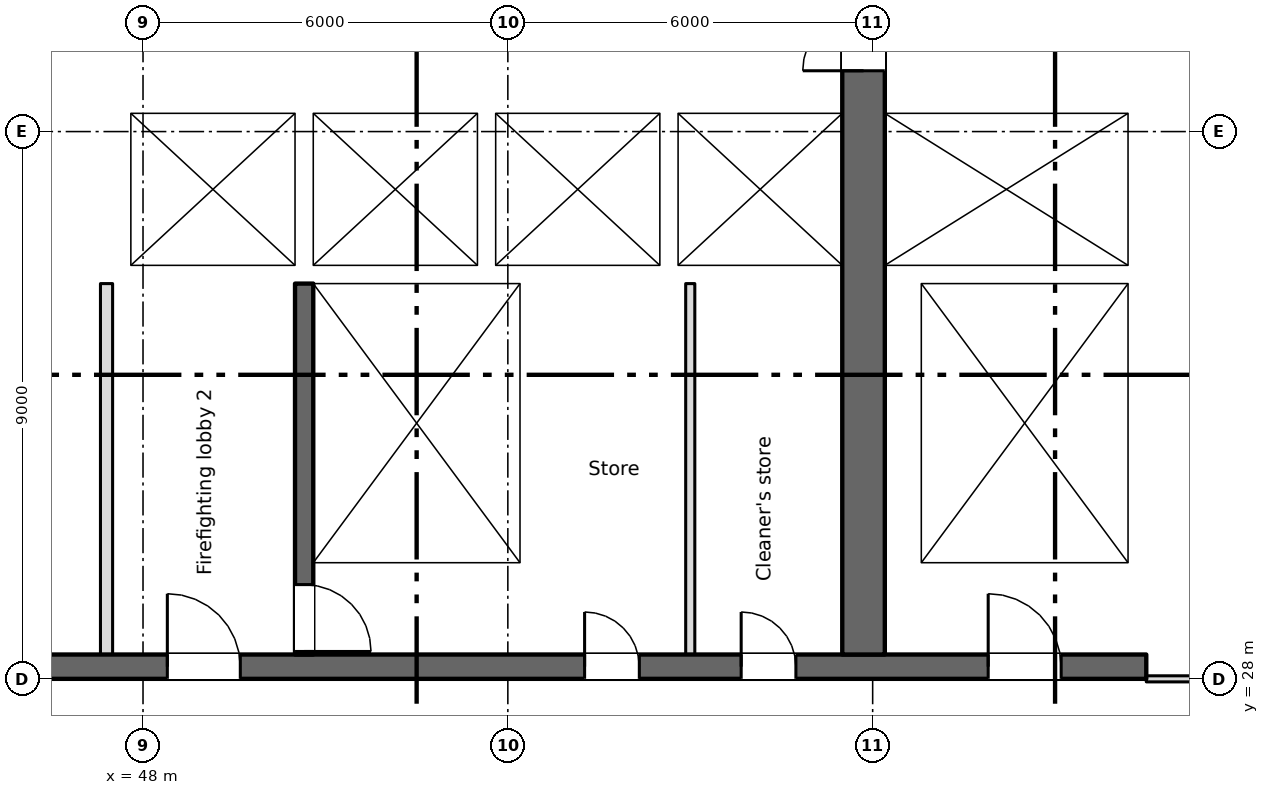
"""IFC4 building model, lengths in metres.
Left out: names, types, materials, properties, quantities, classifications, styles, units other than length and angle.
Written with IfcOpenShell. Run it as: python <this file> out.ifc"""

import sys

from ifc_helpers import new_model, si_unit, direction, frame, frame_2d, origin, place, context, subcontext, project, spatial, rectangle, extrude, element, fill, save


model = new_model("IFC4")
c1 = context("Model", 3, precision=1e-05, world=origin(), true_north=direction((0.0, 1.0)))
c2 = subcontext(c1, "Body", "Model", "MODEL_VIEW")
j1 = project(units=[si_unit("LENGTHUNIT", "METRE"), si_unit("PLANEANGLEUNIT", "RADIAN")], contexts=[c1])
p1 = place(None, origin())
s1 = spatial("IfcSite", under=j1, at=p1, CompositionType="ELEMENT")
p2 = place(p1, origin())
s2 = spatial("IfcBuilding", under=s1, at=p2, CompositionType="ELEMENT")
p3 = place(p2, frame((0.0, 0.0, 200.5)))
s3 = spatial("IfcBuildingStorey", under=s2, at=p3, CompositionType="ELEMENT", Elevation=200.5)
p4 = place(p3, frame((6.6, 28.2, 0.0), z_axis=(0.0, 0.0, 1.0), x_axis=(1.0, 0.0, 0.0)))
e1 = element("IfcWall", 1, at=p4, inside=s3, PredefinedType="SHEAR", context=c2, shape_type="SweptSolid", body=[
    extrude(rectangle(XDim=57.9, YDim=0.4, at=frame_2d((28.95, 0.0))), origin(), (0.0, 0.0, 1.0), 3.35),
])
p5 = place(p4, frame((13.95, 0.0, 0.0)))
e2 = element("IfcOpeningElement", 2, at=p5, cuts=e1, PredefinedType="OPENING", context=c2, shape_type="SweptSolid", body=[
    extrude(rectangle(XDim=0.9, YDim=2.1, at=frame_2d((0.45, 1.05))), frame((0.0, 0.21, 0.0), z_axis=(0.0, -1.0, 0.0), x_axis=(1.0, 0.0, 0.0)), (0.0, 0.0, 1.0), 0.42),
])
p6 = place(p4, frame((48.663, 0.0, 0.0)))
e3 = element("IfcOpeningElement", 3, at=p6, cuts=e1, PredefinedType="OPENING", context=c2, shape_type="SweptSolid", body=[
    extrude(rectangle(XDim=0.9, YDim=2.1, at=frame_2d((0.45, 1.05))), frame((0.0, 0.21, 0.0), z_axis=(0.0, -1.0, 0.0), x_axis=(1.0, 0.0, 0.0)), (0.0, 0.0, 1.0), 0.42),
])
p7 = place(p4, frame((51.238, 0.0, 0.0)))
e4 = element("IfcOpeningElement", 4, at=p7, cuts=e1, PredefinedType="OPENING", context=c2, shape_type="SweptSolid", body=[
    extrude(rectangle(XDim=0.9, YDim=2.1, at=frame_2d((0.45, 1.05))), frame((0.0, 0.21, 0.0), z_axis=(0.0, -1.0, 0.0), x_axis=(1.0, 0.0, 0.0)), (0.0, 0.0, 1.0), 0.42),
])
p8 = place(p4, frame((1.45, 0.0, 0.0)))
e5 = element("IfcOpeningElement", 5, at=p8, cuts=e1, PredefinedType="OPENING", context=c2, shape_type="SweptSolid", body=[
    extrude(rectangle(XDim=0.9, YDim=2.1, at=frame_2d((0.45, 1.05))), frame((0.0, 0.21, 0.0), z_axis=(0.0, -1.0, 0.0), x_axis=(1.0, 0.0, 0.0)), (0.0, 0.0, 1.0), 0.42),
])
p9 = place(p4, frame((4.8, 0.0, 0.0)))
e6 = element("IfcOpeningElement", 6, at=p9, cuts=e1, PredefinedType="OPENING", context=c2, shape_type="SweptSolid", body=[
    extrude(rectangle(XDim=1.2, YDim=2.1, at=frame_2d((0.6, 1.05))), frame((0.0, 0.21, 0.0), z_axis=(0.0, -1.0, 0.0), x_axis=(1.0, 0.0, 0.0)), (0.0, 0.0, 1.0), 0.42),
])
p10 = place(p4, frame((31.8, 0.0, 0.0)))
e7 = element("IfcOpeningElement", 7, at=p10, cuts=e1, PredefinedType="OPENING", context=c2, shape_type="SweptSolid", body=[
    extrude(rectangle(XDim=1.2, YDim=2.1, at=frame_2d((0.6, 1.05))), frame((0.0, 0.21, 0.0), z_axis=(0.0, -1.0, 0.0), x_axis=(1.0, 0.0, 0.0)), (0.0, 0.0, 1.0), 0.42),
])
p11 = place(p4, frame((55.3, 0.0, 0.0)))
e8 = element("IfcOpeningElement", 8, at=p11, cuts=e1, PredefinedType="OPENING", context=c2, shape_type="SweptSolid", body=[
    extrude(rectangle(XDim=1.2, YDim=2.1, at=frame_2d((0.6, 1.05))), frame((0.0, 0.21, 0.0), z_axis=(0.0, -1.0, 0.0), x_axis=(1.0, 0.0, 0.0)), (0.0, 0.0, 1.0), 0.42),
])
p12 = place(p4, frame((21.8, 0.0, 0.0)))
e9 = element("IfcOpeningElement", 9, at=p12, cuts=e1, PredefinedType="OPENING", context=c2, shape_type="SweptSolid", body=[
    extrude(rectangle(XDim=1.2, YDim=2.1, at=frame_2d((0.6, 1.05))), frame((0.0, 0.21, 0.0), z_axis=(0.0, -1.0, 0.0), x_axis=(1.0, 0.0, 0.0)), (0.0, 0.0, 1.0), 0.42),
])
p13 = place(p4, frame((41.8, 0.0, 0.0)))
e10 = element("IfcOpeningElement", 10, at=p13, cuts=e1, PredefinedType="OPENING", context=c2, shape_type="SweptSolid", body=[
    extrude(rectangle(XDim=1.2, YDim=2.1, at=frame_2d((0.6, 1.05))), frame((0.0, 0.21, 0.0), z_axis=(0.0, -1.0, 0.0), x_axis=(1.0, 0.0, 0.0)), (0.0, 0.0, 1.0), 0.42),
])
p14 = place(p4, frame((24.95, 0.0, 0.0)))
e11 = element("IfcOpeningElement", 11, at=p14, cuts=e1, PredefinedType="OPENING", context=c2, shape_type="SweptSolid", body=[
    extrude(rectangle(XDim=2.4, YDim=2.1, at=frame_2d((1.2, 1.05))), frame((0.0, 0.21, 0.0), z_axis=(0.0, -1.0, 0.0), x_axis=(1.0, 0.0, 0.0)), (0.0, 0.0, 1.0), 0.42),
])
p15 = place(p4, frame((37.45, 0.0, 0.0)))
e12 = element("IfcOpeningElement", 12, at=p15, cuts=e1, PredefinedType="OPENING", context=c2, shape_type="SweptSolid", body=[
    extrude(rectangle(XDim=2.4, YDim=2.1, at=frame_2d((1.2, 1.05))), frame((0.0, 0.21, 0.0), z_axis=(0.0, -1.0, 0.0), x_axis=(1.0, 0.0, 0.0)), (0.0, 0.0, 1.0), 0.42),
])
p16 = place(p4, frame((8.1, 0.0, 0.0)))
e13 = element("IfcOpeningElement", 13, at=p16, cuts=e1, PredefinedType="OPENING", context=c2, shape_type="SweptSolid", body=[
    extrude(rectangle(XDim=2.4, YDim=2.1, at=frame_2d((1.2, 1.05))), frame((0.0, 0.21, 0.0), z_axis=(0.0, -1.0, 0.0), x_axis=(1.0, 0.0, 0.0)), (0.0, 0.0, 1.0), 0.42),
])
p17 = place(p4, frame((28.95, 0.0, 0.0)))
e14 = element("IfcOpeningElement", 14, at=p17, cuts=e1, PredefinedType="OPENING", context=c2, shape_type="SweptSolid", body=[
    extrude(rectangle(XDim=0.9, YDim=2.1, at=frame_2d((0.45, 1.05))), frame((0.0, 0.21, 0.0), z_axis=(0.0, -1.0, 0.0), x_axis=(1.0, 0.0, 0.0)), (0.0, 0.0, 1.0), 0.42),
])
p18 = place(p4, frame((34.95, 0.0, 0.0)))
e15 = element("IfcOpeningElement", 15, at=p18, cuts=e1, PredefinedType="OPENING", context=c2, shape_type="SweptSolid", body=[
    extrude(rectangle(XDim=0.9, YDim=2.1, at=frame_2d((0.45, 1.05))), frame((0.0, 0.21, 0.0), z_axis=(0.0, -1.0, 0.0), x_axis=(1.0, 0.0, 0.0)), (0.0, 0.0, 1.0), 0.42),
])
p19 = place(p3, frame((64.35, 34.8, 0.0), z_axis=(0.0, 0.0, 1.0), x_axis=(0.0, 1.0, 0.0)))
e16 = element("IfcWall", 16, at=p19, inside=s3, PredefinedType="SHEAR", context=c2, shape_type="SweptSolid", body=[
    extrude(rectangle(XDim=10.5, YDim=0.3, at=frame_2d((5.25, 0.0))), origin(), (0.0, 0.0, 1.0), 3.35),
])
p20 = place(p3, frame((59.85, 28.4, 0.0), z_axis=(0.0, 0.0, 1.0), x_axis=(0.0, 1.0, 0.0)))
e17 = element("IfcWall", 17, at=p20, inside=s3, PredefinedType="SHEAR", context=c2, shape_type="SweptSolid", body=[
    extrude(rectangle(XDim=16.9, YDim=0.7, at=frame_2d((8.45, 0.0))), origin(), (0.0, 0.0, 1.0), 3.35),
])
p21 = place(p20, frame((9.6, 0.0, 0.0)))
e18 = element("IfcOpeningElement", 18, at=p21, cuts=e17, PredefinedType="OPENING", context=c2, shape_type="SweptSolid", body=[
    extrude(rectangle(XDim=2.0, YDim=2.1, at=frame_2d((1.0, 1.05))), frame((0.0, 0.36, 0.0), z_axis=(0.0, -1.0, 0.0), x_axis=(1.0, 0.0, 0.0)), (0.0, 0.0, 1.0), 0.72),
])
p22 = place(p20, frame((15.4, 0.0, 0.0)))
e19 = element("IfcOpeningElement", 19, at=p22, cuts=e17, PredefinedType="OPENING", context=c2, shape_type="SweptSolid", body=[
    extrude(rectangle(XDim=1.2, YDim=2.1, at=frame_2d((0.6, 1.05))), frame((0.0, 0.36, 0.0), z_axis=(0.0, -1.0, 0.0), x_axis=(1.0, 0.0, 0.0)), (0.0, 0.0, 1.0), 0.72),
])
p23 = place(p3, frame((50.65, 34.5, 0.0), z_axis=(0.0, 0.0, 1.0), x_axis=(0.0, -1.0, 0.0)))
e20 = element("IfcWall", 20, at=p23, inside=s3, PredefinedType="SHEAR", context=c2, shape_type="SweptSolid", body=[
    extrude(rectangle(XDim=6.1, YDim=0.3, at=frame_2d((3.05, 0.0))), origin(), (0.0, 0.0, 1.0), 3.35),
])
p24 = place(p23, frame((4.95, 0.0, 0.0)))
e21 = element("IfcOpeningElement", 21, at=p24, cuts=e20, PredefinedType="OPENING", context=c2, shape_type="SweptSolid", body=[
    extrude(rectangle(XDim=1.1, YDim=2.1, at=frame_2d((0.55, 1.05))), frame((0.0, 0.16, 0.0), z_axis=(0.0, -1.0, 0.0), x_axis=(1.0, 0.0, 0.0)), (0.0, 0.0, 1.0), 0.32),
])
p25 = place(p3, frame((54.35, 28.4, 0.0), z_axis=(0.0, 0.0, 1.0), x_axis=(0.0, 1.0, 0.0)))
e22 = element("IfcWall", 22, at=p25, inside=s3, PredefinedType="SHEAR", context=c2, shape_type="SweptSolid", body=[
    extrude(rectangle(XDim=6.1, YDim=0.3, at=frame_2d((3.05, 0.0))), origin(), (0.0, 0.0, 1.0), 3.35),
])
p26 = place(p3, frame((60.5, 28.4, 0.0), z_axis=(0.0, 0.0, 1.0), x_axis=(0.0, 1.0, 0.0)))
e23 = element("IfcWall", 23, at=p26, inside=s3, PredefinedType="SHEAR", context=c2, shape_type="SweptSolid", body=[
    extrude(rectangle(XDim=6.1, YDim=0.6, at=frame_2d((3.05, 0.0))), origin(), (0.0, 0.0, 1.0), 3.35),
])
p27 = place(p3, frame((64.35, 28.4, 0.0), z_axis=(0.0, 0.0, 1.0), x_axis=(0.0, 1.0, 0.0)))
e24 = element("IfcWall", 24, at=p27, inside=s3, PredefinedType="SHEAR", context=c2, shape_type="SweptSolid", body=[
    extrude(rectangle(XDim=6.1, YDim=0.3, at=frame_2d((3.05, 0.0))), origin(), (0.0, 0.0, 1.0), 3.35),
])
p28 = place(p3, frame((47.3, 34.65, 0.0), z_axis=(0.0, 0.0, 1.0), x_axis=(1.0, 0.0, 0.0)))
e25 = element("IfcWall", 25, at=p28, inside=s3, PredefinedType="SHEAR", context=c2, shape_type="SweptSolid", body=[
    extrude(rectangle(XDim=12.2, YDim=0.3, at=frame_2d((6.1, 0.0))), origin(), (0.0, 0.0, 1.0), 3.35),
])
p29 = place(p28, frame((1.3, 0.0, 0.0)))
e26 = element("IfcOpeningElement", 26, at=p29, cuts=e25, PredefinedType="OPENING", context=c2, shape_type="SweptSolid", body=[
    extrude(rectangle(XDim=1.1, YDim=2.1, at=frame_2d((0.55, 1.05))), frame((0.0, 0.16, 0.0), z_axis=(0.0, -1.0, 0.0), x_axis=(1.0, 0.0, 0.0)), (0.0, 0.0, 1.0), 0.32),
])
p30 = place(p3, frame((60.2, 34.65, 0.0), z_axis=(0.0, 0.0, 1.0), x_axis=(1.0, 0.0, 0.0)))
e27 = element("IfcWall", 27, at=p30, inside=s3, PredefinedType="SHEAR", context=c2, shape_type="SweptSolid", body=[
    extrude(rectangle(XDim=4.3, YDim=0.3, at=frame_2d((2.15, 0.0))), origin(), (0.0, 0.0, 1.0), 3.35),
])
p31 = place(p3, frame((47.3, 37.45, 0.0), z_axis=(0.0, 0.0, 1.0), x_axis=(1.0, 0.0, 0.0)))
e28 = element("IfcWall", 28, at=p31, inside=s3, PredefinedType="SHEAR", context=c2, shape_type="SweptSolid", body=[
    extrude(rectangle(XDim=12.2, YDim=0.3, at=frame_2d((6.1, 0.0))), origin(), (0.0, 0.0, 1.0), 3.35),
])
p32 = place(p31, frame((4.3, 0.0, 0.0)))
e29 = element("IfcOpeningElement", 29, at=p32, cuts=e28, PredefinedType="OPENING", context=c2, shape_type="SweptSolid", body=[
    extrude(rectangle(XDim=1.1, YDim=2.1, at=frame_2d((0.55, 1.05))), frame((0.0, 0.16, 0.0), z_axis=(0.0, -1.0, 0.0), x_axis=(1.0, 0.0, 0.0)), (0.0, 0.0, 1.0), 0.32),
])
p33 = place(p31, frame((7.3, 0.0, 0.0)))
e30 = element("IfcOpeningElement", 30, at=p33, cuts=e28, PredefinedType="OPENING", context=c2, shape_type="SweptSolid", body=[
    extrude(rectangle(XDim=1.1, YDim=2.1, at=frame_2d((0.55, 1.05))), frame((0.0, 0.16, 0.0), z_axis=(0.0, -1.0, 0.0), x_axis=(1.0, 0.0, 0.0)), (0.0, 0.0, 1.0), 0.32),
])
p34 = place(p31, frame((10.3, 0.0, 0.0)))
e31 = element("IfcOpeningElement", 31, at=p34, cuts=e28, PredefinedType="OPENING", context=c2, shape_type="SweptSolid", body=[
    extrude(rectangle(XDim=1.1, YDim=2.1, at=frame_2d((0.55, 1.05))), frame((0.0, 0.16, 0.0), z_axis=(0.0, -1.0, 0.0), x_axis=(1.0, 0.0, 0.0)), (0.0, 0.0, 1.0), 0.32),
])
p35 = place(p3, frame((60.2, 37.45, 0.0), z_axis=(0.0, 0.0, 1.0), x_axis=(1.0, 0.0, 0.0)))
e32 = element("IfcWall", 32, at=p35, inside=s3, PredefinedType="SHEAR", context=c2, shape_type="SweptSolid", body=[
    extrude(rectangle(XDim=4.0, YDim=0.3, at=frame_2d((2.0, 0.0))), origin(), (0.0, 0.0, 1.0), 3.35),
])
p36 = place(p35, frame((1.45, 0.0, 0.0)))
e33 = element("IfcOpeningElement", 33, at=p36, cuts=e32, PredefinedType="OPENING", context=c2, shape_type="SweptSolid", body=[
    extrude(rectangle(XDim=1.1, YDim=2.1, at=frame_2d((0.55, 1.05))), frame((0.0, 0.16, 0.0), z_axis=(0.0, -1.0, 0.0), x_axis=(1.0, 0.0, 0.0)), (0.0, 0.0, 1.0), 0.32),
])
p37 = place(p3, frame((47.55, 34.8, 0.0), z_axis=(0.0, 0.0, 1.0), x_axis=(0.0, 1.0, 0.0)))
e34 = element("IfcWall", 34, at=p37, inside=s3, PredefinedType="SHEAR", context=c2, shape_type="SweptSolid", body=[
    extrude(rectangle(XDim=2.5, YDim=0.5, at=frame_2d((1.25, 0.0))), origin(), (0.0, 0.0, 1.0), 3.35),
])
for number, where, z_axis, x_axis in (
    (35, (50.65, 34.8, 0.0), (0.0, 0.0, 1.0), (0.0, 1.0, 0.0)),
    (36, (53.65, 34.8, 0.0), (0.0, 0.0, 1.0), (0.0, 1.0, 0.0)),
    (37, (56.65, 34.8, 0.0), (0.0, 0.0, 1.0), (0.0, 1.0, 0.0)),
):
    element("IfcWall", number, at=place(p3, frame(where, z_axis=z_axis, x_axis=x_axis)), inside=s3, PredefinedType="SHEAR", context=c2, shape_type="SweptSolid", body=[
        extrude(rectangle(XDim=2.5, YDim=0.3, at=frame_2d((1.25, 0.0))), origin(), (0.0, 0.0, 1.0), 3.35),
    ])
p38 = place(p3, frame((47.4, 28.4, 0.0), z_axis=(0.0, 0.0, 1.0), x_axis=(0.0, 1.0, 0.0)))
e38 = element("IfcWall", 38, at=p38, inside=s3, PredefinedType="PARTITIONING", context=c2, shape_type="SweptSolid", body=[
    extrude(rectangle(XDim=6.1, YDim=0.2, at=frame_2d((3.05, 0.0))), origin(), (0.0, 0.0, 1.0), 3.35),
])
p39 = place(p3, frame((57.0, 28.4, 0.0), z_axis=(0.0, 0.0, 1.0), x_axis=(0.0, 1.0, 0.0)))
e39 = element("IfcWall", 39, at=p39, inside=s3, PredefinedType="PARTITIONING", context=c2, shape_type="SweptSolid", body=[
    extrude(rectangle(XDim=6.1, YDim=0.15, at=frame_2d((3.05, 0.0))), origin(), (0.0, 0.0, 1.0), 3.35),
])
p40 = place(p3, frame((64.5, 28.0, 0.0), z_axis=(0.0, 0.0, 1.0), x_axis=(1.0, 0.0, 0.0)))
e40 = element("IfcWall", 40, at=p40, inside=s3, PredefinedType="PARTITIONING", context=c2, shape_type="SweptSolid", body=[
    extrude(rectangle(XDim=6.9, YDim=0.1, at=frame_2d((3.45, 0.0))), origin(), (0.0, 0.0, 1.0), 3.35),
])
p41 = place(p40, frame((2.55, 0.0, 0.0)))
e41 = element("IfcOpeningElement", 41, at=p41, cuts=e40, PredefinedType="OPENING", context=c2, shape_type="SweptSolid", body=[
    extrude(rectangle(XDim=1.8, YDim=2.1, at=frame_2d((0.9, 1.05))), frame((0.0, 0.06, 0.0), z_axis=(0.0, -1.0, 0.0), x_axis=(1.0, 0.0, 0.0)), (0.0, 0.0, 1.0), 0.12),
])
p42 = place(p6, origin())
e42 = element("IfcDoor", 42, at=p42, inside=s3, OperationType="SINGLE_SWING_LEFT", PredefinedType="DOOR", context=c2, shape_type="SweptSolid", body=[
    extrude(rectangle(XDim=0.9, YDim=2.1, at=frame_2d((0.45, 1.05))), frame((0.0, 0.025, 0.0), z_axis=(0.0, -1.0, 0.0), x_axis=(1.0, 0.0, 0.0)), (0.0, 0.0, 1.0), 0.05),
])
fill(e3, e42)
p43 = place(p7, origin())
e43 = element("IfcDoor", 43, at=p43, inside=s3, OperationType="SINGLE_SWING_LEFT", PredefinedType="DOOR", context=c2, shape_type="SweptSolid", body=[
    extrude(rectangle(XDim=0.9, YDim=2.1, at=frame_2d((0.45, 1.05))), frame((0.0, 0.025, 0.0), z_axis=(0.0, -1.0, 0.0), x_axis=(1.0, 0.0, 0.0)), (0.0, 0.0, 1.0), 0.05),
])
fill(e4, e43)
p44 = place(p32, origin())
e44 = element("IfcDoor", 44, at=p44, inside=s3, OperationType="SLIDING_TO_LEFT", PredefinedType="DOOR", context=c2, shape_type="SweptSolid", body=[
    extrude(rectangle(XDim=1.1, YDim=2.1, at=frame_2d((0.55, 1.05))), frame((0.0, 0.025, 0.0), z_axis=(0.0, -1.0, 0.0), x_axis=(1.0, 0.0, 0.0)), (0.0, 0.0, 1.0), 0.05),
])
fill(e29, e44)
p45 = place(p33, origin())
e45 = element("IfcDoor", 45, at=p45, inside=s3, OperationType="SLIDING_TO_LEFT", PredefinedType="DOOR", context=c2, shape_type="SweptSolid", body=[
    extrude(rectangle(XDim=1.1, YDim=2.1, at=frame_2d((0.55, 1.05))), frame((0.0, 0.025, 0.0), z_axis=(0.0, -1.0, 0.0), x_axis=(1.0, 0.0, 0.0)), (0.0, 0.0, 1.0), 0.05),
])
fill(e30, e45)
p46 = place(p34, origin())
e46 = element("IfcDoor", 46, at=p46, inside=s3, OperationType="SLIDING_TO_LEFT", PredefinedType="DOOR", context=c2, shape_type="SweptSolid", body=[
    extrude(rectangle(XDim=1.1, YDim=2.1, at=frame_2d((0.55, 1.05))), frame((0.0, 0.025, 0.0), z_axis=(0.0, -1.0, 0.0), x_axis=(1.0, 0.0, 0.0)), (0.0, 0.0, 1.0), 0.05),
])
fill(e31, e46)
p47 = place(p36, origin())
e47 = element("IfcDoor", 47, at=p47, inside=s3, OperationType="SLIDING_TO_LEFT", PredefinedType="DOOR", context=c2, shape_type="SweptSolid", body=[
    extrude(rectangle(XDim=1.1, YDim=2.1, at=frame_2d((0.55, 1.05))), frame((0.0, 0.025, 0.0), z_axis=(0.0, -1.0, 0.0), x_axis=(1.0, 0.0, 0.0)), (0.0, 0.0, 1.0), 0.05),
])
fill(e33, e47)
p48 = place(p29, origin())
e48 = element("IfcDoor", 48, at=p48, inside=s3, OperationType="SLIDING_TO_LEFT", PredefinedType="DOOR", context=c2, shape_type="SweptSolid", body=[
    extrude(rectangle(XDim=1.1, YDim=2.1, at=frame_2d((0.55, 1.05))), frame((0.0, 0.025, 0.0), z_axis=(0.0, -1.0, 0.0), x_axis=(1.0, 0.0, 0.0)), (0.0, 0.0, 1.0), 0.05),
])
fill(e26, e48)
p49 = place(p24, origin())
e49 = element("IfcDoor", 49, at=p49, inside=s3, OperationType="SINGLE_SWING_RIGHT", PredefinedType="DOOR", context=c2, shape_type="SweptSolid", body=[
    extrude(rectangle(XDim=1.1, YDim=2.1, at=frame_2d((0.55, 1.05))), frame((0.0, 0.025, 0.0), z_axis=(0.0, -1.0, 0.0), x_axis=(1.0, 0.0, 0.0)), (0.0, 0.0, 1.0), 0.05),
])
fill(e21, e49)
p50 = place(p11, origin())
e50 = element("IfcDoor", 50, at=p50, inside=s3, OperationType="SINGLE_SWING_LEFT", PredefinedType="DOOR", context=c2, shape_type="SweptSolid", body=[
    extrude(rectangle(XDim=1.2, YDim=2.1, at=frame_2d((0.6, 1.05))), frame((0.0, 0.025, 0.0), z_axis=(0.0, -1.0, 0.0), x_axis=(1.0, 0.0, 0.0)), (0.0, 0.0, 1.0), 0.05),
])
fill(e8, e50)
p51 = place(p13, origin())
e51 = element("IfcDoor", 51, at=p51, inside=s3, OperationType="SINGLE_SWING_LEFT", PredefinedType="DOOR", context=c2, shape_type="SweptSolid", body=[
    extrude(rectangle(XDim=1.2, YDim=2.1, at=frame_2d((0.6, 1.05))), frame((0.0, 0.025, 0.0), z_axis=(0.0, -1.0, 0.0), x_axis=(1.0, 0.0, 0.0)), (0.0, 0.0, 1.0), 0.05),
])
fill(e10, e51)
p52 = place(p21, origin())
e52 = element("IfcDoor", 52, at=p52, inside=s3, OperationType="DOUBLE_DOOR_SINGLE_SWING", PredefinedType="DOOR", context=c2, shape_type="SweptSolid", body=[
    extrude(rectangle(XDim=2.0, YDim=2.1, at=frame_2d((1.0, 1.05))), frame((0.0, 0.025, 0.0), z_axis=(0.0, -1.0, 0.0), x_axis=(1.0, 0.0, 0.0)), (0.0, 0.0, 1.0), 0.05),
])
fill(e18, e52)
save(model, sys.argv[1])
